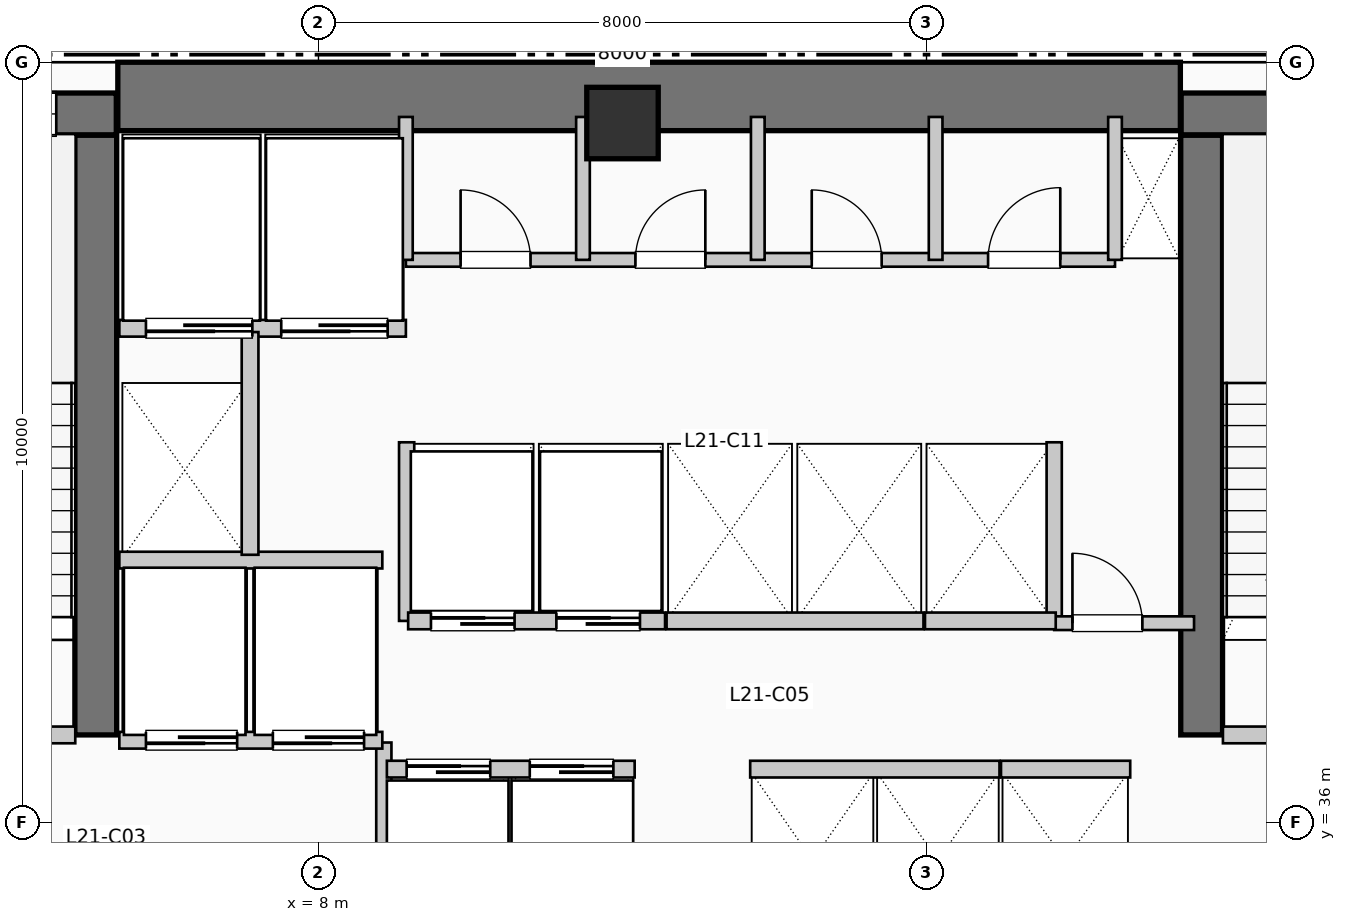
"""IFC4 building model, lengths in metres.
Left out: names, types, materials, properties, quantities, classifications, styles, units other than length and angle.
Written with IfcOpenShell. Run it as: python <this file> out.ifc"""

import sys

from ifc_helpers import new_model, si_unit, direction, frame, frame_2d, origin, origin_2d, place, context, subcontext, project, spatial, rectangle, extrude, element, fill, save


model = new_model("IFC4")
c1 = context("Model", 3, precision=1e-05, world=origin(), true_north=direction((0.0, 1.0)))
c2 = subcontext(c1, "Body", "Model", "MODEL_VIEW")
j1 = project(units=[si_unit("LENGTHUNIT", "METRE"), si_unit("PLANEANGLEUNIT", "RADIAN")], contexts=[c1])
p1 = place(None, origin())
s1 = spatial("IfcSite", under=j1, at=p1, CompositionType="ELEMENT")
p2 = place(p1, origin())
s2 = spatial("IfcBuilding", under=s1, at=p2, CompositionType="ELEMENT")
p3 = place(p2, frame((0.0, 0.0, 89.76)))
s3 = spatial("IfcBuildingStorey", under=s2, at=p3, CompositionType="ELEMENT", Elevation=89.76)
p4 = place(p3, frame((5.36, 45.55, 0.0), z_axis=(0.0, 0.0, 1.0), x_axis=(1.0, 0.0, 0.0)))
e1 = element("IfcWall", 1, at=p4, inside=s3, PredefinedType="SHEAR", context=c2, shape_type="SweptSolid", body=[
    extrude(rectangle(XDim=13.98, YDim=0.9, at=frame_2d((6.99, 0.0))), origin(), (0.0, 0.0, 1.0), 3.96),
])
p5 = place(p3, frame((5.07, 37.15, 0.0), z_axis=(0.0, 0.0, 1.0), x_axis=(0.0, 1.0, 0.0)))
e2 = element("IfcWall", 2, at=p5, inside=s3, PredefinedType="SHEAR", context=c2, shape_type="SweptSolid", body=[
    extrude(rectangle(XDim=7.89, YDim=0.55, at=frame_2d((3.945, 0.0))), origin(), (0.0, 0.0, 1.0), 3.96),
])
p6 = place(p3, frame((1.1, 45.32, 0.0), z_axis=(0.0, 0.0, 1.0), x_axis=(1.0, 0.0, 0.0)))
e3 = element("IfcWall", 3, at=p6, inside=s3, PredefinedType="SHEAR", context=c2, shape_type="SweptSolid", body=[
    extrude(rectangle(XDim=4.24, YDim=0.55, at=frame_2d((2.12, 0.0))), origin(), (0.0, 0.0, 1.0), 3.96),
])
p7 = place(p6, frame((2.05, 0.0, 1.05)))
e4 = element("IfcOpeningElement", 4, at=p7, cuts=e3, PredefinedType="OPENING", context=c2, shape_type="SweptSolid", body=[
    extrude(rectangle(XDim=1.4, YDim=1.8, at=frame_2d((0.7, 0.9))), frame((0.0, 0.285, 0.0), z_axis=(0.0, -1.0, 0.0), x_axis=(1.0, 0.0, 0.0)), (0.0, 0.0, 1.0), 0.57),
])
p8 = place(p3, frame((19.62, 37.15, 0.0), z_axis=(0.0, 0.0, 1.0), x_axis=(0.0, 1.0, 0.0)))
e5 = element("IfcWall", 5, at=p8, inside=s3, PredefinedType="SHEAR", context=c2, shape_type="SweptSolid", body=[
    extrude(rectangle(XDim=7.89, YDim=0.55, at=frame_2d((3.945, 0.0))), origin(), (0.0, 0.0, 1.0), 3.96),
])
p9 = place(p3, frame((19.35, 45.32, 0.0), z_axis=(0.0, 0.0, 1.0), x_axis=(1.0, 0.0, 0.0)))
e6 = element("IfcWall", 6, at=p9, inside=s3, PredefinedType="SHEAR", context=c2, shape_type="SweptSolid", body=[
    extrude(rectangle(XDim=3.69, YDim=0.55, at=frame_2d((1.845, 0.0))), origin(), (0.0, 0.0, 1.0), 3.96),
])
p10 = place(p9, frame((1.15, 0.0, 1.05)))
e7 = element("IfcOpeningElement", 7, at=p10, cuts=e6, PredefinedType="OPENING", context=c2, shape_type="SweptSolid", body=[
    extrude(rectangle(XDim=1.4, YDim=1.8, at=frame_2d((0.7, 0.9))), frame((0.0, 0.285, 0.0), z_axis=(0.0, -1.0, 0.0), x_axis=(1.0, 0.0, 0.0)), (0.0, 0.0, 1.0), 0.57),
])
p11 = place(p3, frame((12.0, 45.2, 0.0), z_axis=(0.0, 0.0, 1.0), x_axis=(1.0, 0.0, 0.0)))
e8 = element("IfcColumn", 8, at=p11, inside=s3, PredefinedType="COLUMN", context=c2, shape_type="SweptSolid", body=[
    extrude(rectangle(XDim=0.94, YDim=0.94, at=origin_2d()), origin(), (0.0, 0.0, 1.0), 3.96),
])
p12 = place(p3, frame((1.65, 37.15, 0.0), z_axis=(0.0, 0.0, 1.0), x_axis=(1.0, 0.0, 0.0)))
e9 = element("IfcWall", 9, at=p12, inside=s3, PredefinedType="PARTITIONING", context=c2, shape_type="SweptSolid", body=[
    extrude(rectangle(XDim=3.15, YDim=0.22, at=frame_2d((1.575, 0.0))), origin(), (0.0, 0.0, 1.0), 3.61),
])
p13 = place(p12, frame((2.05, 0.0, 0.0), z_axis=(0.0, 0.0, 1.0), x_axis=(-1.0, 0.0, 0.0)))
e10 = element("IfcOpeningElement", 10, at=p13, cuts=e9, PredefinedType="OPENING", context=c2, shape_type="SweptSolid", body=[
    extrude(rectangle(XDim=1.05, YDim=2.15, at=frame_2d((0.525, 1.075))), frame((0.0, 0.12, 0.0), z_axis=(0.0, -1.0, 0.0), x_axis=(1.0, 0.0, 0.0)), (0.0, 0.0, 1.0), 0.24),
])
p14 = place(p3, frame((8.86, 34.55, 0.0), z_axis=(0.0, 0.0, 1.0), x_axis=(0.0, 1.0, 0.0)))
e11 = element("IfcWall", 11, at=p14, inside=s3, PredefinedType="PARTITIONING", context=c2, shape_type="SweptSolid", body=[
    extrude(rectangle(XDim=2.5, YDim=0.2, at=frame_2d((1.25, 0.0))), origin(), (0.0, 0.0, 1.0), 3.61),
])
p15 = place(p3, frame((19.9, 37.15, 0.0), z_axis=(0.0, 0.0, 1.0), x_axis=(1.0, 0.0, 0.0)))
e12 = element("IfcWall", 12, at=p15, inside=s3, PredefinedType="PARTITIONING", context=c2, shape_type="SweptSolid", body=[
    extrude(rectangle(XDim=3.15, YDim=0.22, at=frame_2d((1.575, 0.0))), origin(), (0.0, 0.0, 1.0), 3.61),
])
p16 = place(p15, frame((2.05, 0.0, 0.0), z_axis=(0.0, 0.0, 1.0), x_axis=(-1.0, 0.0, 0.0)))
e13 = element("IfcOpeningElement", 13, at=p16, cuts=e12, PredefinedType="OPENING", context=c2, shape_type="SweptSolid", body=[
    extrude(rectangle(XDim=1.05, YDim=2.15, at=frame_2d((0.525, 1.075))), frame((0.0, 0.12, 0.0), z_axis=(0.0, -1.0, 0.0), x_axis=(1.0, 0.0, 0.0)), (0.0, 0.0, 1.0), 0.24),
])
p17 = place(p3, frame((5.38, 37.08, 0.0), z_axis=(0.0, 0.0, 1.0), x_axis=(1.0, 0.0, 0.0)))
e14 = element("IfcWall", 14, at=p17, inside=s3, PredefinedType="PARTITIONING", context=c2, shape_type="SweptSolid", body=[
    extrude(rectangle(XDim=3.46, YDim=0.22, at=frame_2d((1.73, 0.0))), origin(), (0.0, 0.0, 1.0), 3.61),
])
p18 = place(p17, frame((1.55, 0.0, 0.0), z_axis=(0.0, 0.0, 1.0), x_axis=(-1.0, 0.0, 0.0)))
e15 = element("IfcOpeningElement", 15, at=p18, cuts=e14, PredefinedType="OPENING", context=c2, shape_type="SweptSolid", body=[
    extrude(rectangle(XDim=1.2, YDim=2.2, at=frame_2d((0.6, 1.1))), frame((0.0, 0.12, 0.0), z_axis=(0.0, -1.0, 0.0), x_axis=(1.0, 0.0, 0.0)), (0.0, 0.0, 1.0), 0.24),
])
p19 = place(p17, frame((3.22, 0.0, 0.0), z_axis=(0.0, 0.0, 1.0), x_axis=(-1.0, 0.0, 0.0)))
e16 = element("IfcOpeningElement", 16, at=p19, cuts=e14, PredefinedType="OPENING", context=c2, shape_type="SweptSolid", body=[
    extrude(rectangle(XDim=1.2, YDim=2.2, at=frame_2d((0.6, 1.1))), frame((0.0, 0.12, 0.0), z_axis=(0.0, -1.0, 0.0), x_axis=(1.0, 0.0, 0.0)), (0.0, 0.0, 1.0), 0.24),
])
p20 = place(p3, frame((5.38, 39.45, 0.0), z_axis=(0.0, 0.0, 1.0), x_axis=(1.0, 0.0, 0.0)))
e17 = element("IfcWall", 17, at=p20, inside=s3, PredefinedType="PARTITIONING", context=c2, shape_type="SweptSolid", body=[
    extrude(rectangle(XDim=3.46, YDim=0.22, at=frame_2d((1.73, 0.0))), origin(), (0.0, 0.0, 1.0), 3.61),
])
p21 = place(p3, frame((5.38, 42.5, 0.0), z_axis=(0.0, 0.0, 1.0), x_axis=(1.0, 0.0, 0.0)))
e18 = element("IfcWall", 18, at=p21, inside=s3, PredefinedType="PARTITIONING", context=c2, shape_type="SweptSolid", body=[
    extrude(rectangle(XDim=3.77, YDim=0.22, at=frame_2d((1.885, 0.0))), origin(), (0.0, 0.0, 1.0), 3.61),
])
p22 = place(p21, frame((1.75, 0.0, 0.0), z_axis=(0.0, 0.0, 1.0), x_axis=(-1.0, 0.0, 0.0)))
e19 = element("IfcOpeningElement", 19, at=p22, cuts=e18, PredefinedType="OPENING", context=c2, shape_type="SweptSolid", body=[
    extrude(rectangle(XDim=1.4, YDim=2.2, at=frame_2d((0.7, 1.1))), frame((0.0, 0.12, 0.0), z_axis=(0.0, -1.0, 0.0), x_axis=(1.0, 0.0, 0.0)), (0.0, 0.0, 1.0), 0.24),
])
p23 = place(p21, frame((3.53, 0.0, 0.0), z_axis=(0.0, 0.0, 1.0), x_axis=(-1.0, 0.0, 0.0)))
e20 = element("IfcOpeningElement", 20, at=p23, cuts=e18, PredefinedType="OPENING", context=c2, shape_type="SweptSolid", body=[
    extrude(rectangle(XDim=1.4, YDim=2.2, at=frame_2d((0.7, 1.1))), frame((0.0, 0.12, 0.0), z_axis=(0.0, -1.0, 0.0), x_axis=(1.0, 0.0, 0.0)), (0.0, 0.0, 1.0), 0.24),
])
p24 = place(p3, frame((7.1, 39.52, 0.0), z_axis=(0.0, 0.0, 1.0), x_axis=(0.0, 1.0, 0.0)))
e21 = element("IfcWall", 21, at=p24, inside=s3, PredefinedType="PARTITIONING", context=c2, shape_type="SweptSolid", body=[
    extrude(rectangle(XDim=2.93, YDim=0.22, at=frame_2d((1.465, 0.0))), origin(), (0.0, 0.0, 1.0), 3.61),
])
for number, where, z_axis, x_axis in (
    (22, (9.16, 38.65, 0.0), (0.0, 0.0, 1.0), (0.0, 1.0, 0.0)),
    (23, (17.68, 38.65, 0.0), (0.0, 0.0, 1.0), (0.0, 1.0, 0.0)),
):
    element("IfcWall", number, at=place(p3, frame(where, z_axis=z_axis, x_axis=x_axis)), inside=s3, PredefinedType="PARTITIONING", context=c2, shape_type="SweptSolid", body=[
        extrude(rectangle(XDim=2.35, YDim=0.2, at=frame_2d((1.175, 0.0))), origin(), (0.0, 0.0, 1.0), 3.61),
    ])
p25 = place(p3, frame((17.68, 38.62, 0.0), z_axis=(0.0, 0.0, 1.0), x_axis=(1.0, 0.0, 0.0)))
e24 = element("IfcWall", 24, at=p25, inside=s3, PredefinedType="PARTITIONING", context=c2, shape_type="SweptSolid", body=[
    extrude(rectangle(XDim=1.84, YDim=0.18, at=frame_2d((0.92, 0.0))), origin(), (0.0, 0.0, 1.0), 3.61),
])
p26 = place(p25, frame((0.24, 0.0, 0.0)))
e25 = element("IfcOpeningElement", 25, at=p26, cuts=e24, PredefinedType="OPENING", context=c2, shape_type="SweptSolid", body=[
    extrude(rectangle(XDim=0.92, YDim=2.1, at=frame_2d((0.46, 1.05))), frame((0.0, 0.1, 0.0), z_axis=(0.0, -1.0, 0.0), x_axis=(1.0, 0.0, 0.0)), (0.0, 0.0, 1.0), 0.2),
])
p27 = place(p3, frame((8.9, 36.7, 0.0), z_axis=(0.0, 0.0, 1.0), x_axis=(1.0, 0.0, 0.0)))
e26 = element("IfcWall", 26, at=p27, inside=s3, PredefinedType="PARTITIONING", context=c2, shape_type="SweptSolid", body=[
    extrude(rectangle(XDim=3.26, YDim=0.22, at=frame_2d((1.63, 0.0))), origin(), (0.0, 0.0, 1.0), 3.61),
])
p28 = place(p27, frame((0.26, 0.0, 0.0)))
e27 = element("IfcOpeningElement", 27, at=p28, cuts=e26, PredefinedType="OPENING", context=c2, shape_type="SweptSolid", body=[
    extrude(rectangle(XDim=1.1, YDim=2.2, at=frame_2d((0.55, 1.1))), frame((0.0, 0.12, 0.0), z_axis=(0.0, -1.0, 0.0), x_axis=(1.0, 0.0, 0.0)), (0.0, 0.0, 1.0), 0.24),
])
p29 = place(p27, frame((1.88, 0.0, 0.0)))
e28 = element("IfcOpeningElement", 28, at=p29, cuts=e26, PredefinedType="OPENING", context=c2, shape_type="SweptSolid", body=[
    extrude(rectangle(XDim=1.1, YDim=2.2, at=frame_2d((0.55, 1.1))), frame((0.0, 0.12, 0.0), z_axis=(0.0, -1.0, 0.0), x_axis=(1.0, 0.0, 0.0)), (0.0, 0.0, 1.0), 0.24),
])
p30 = place(p3, frame((9.18, 38.65, 0.0), z_axis=(0.0, 0.0, 1.0), x_axis=(1.0, 0.0, 0.0)))
e29 = element("IfcWall", 29, at=p30, inside=s3, PredefinedType="PARTITIONING", context=c2, shape_type="SweptSolid", body=[
    extrude(rectangle(XDim=3.38, YDim=0.22, at=frame_2d((1.69, 0.0))), origin(), (0.0, 0.0, 1.0), 3.61),
])
p31 = place(p30, frame((0.3, 0.0, 0.0)))
e30 = element("IfcOpeningElement", 30, at=p31, cuts=e29, PredefinedType="OPENING", context=c2, shape_type="SweptSolid", body=[
    extrude(rectangle(XDim=1.1, YDim=2.2, at=frame_2d((0.55, 1.1))), frame((0.0, 0.12, 0.0), z_axis=(0.0, -1.0, 0.0), x_axis=(1.0, 0.0, 0.0)), (0.0, 0.0, 1.0), 0.24),
])
p32 = place(p30, frame((1.95, 0.0, 0.0)))
e31 = element("IfcOpeningElement", 31, at=p32, cuts=e29, PredefinedType="OPENING", context=c2, shape_type="SweptSolid", body=[
    extrude(rectangle(XDim=1.1, YDim=2.2, at=frame_2d((0.55, 1.1))), frame((0.0, 0.12, 0.0), z_axis=(0.0, -1.0, 0.0), x_axis=(1.0, 0.0, 0.0)), (0.0, 0.0, 1.0), 0.24),
])
p33 = place(p3, frame((13.68, 36.7, 0.0), z_axis=(0.0, 0.0, 1.0), x_axis=(1.0, 0.0, 0.0)))
e32 = element("IfcWall", 32, at=p33, inside=s3, PredefinedType="PARTITIONING", context=c2, shape_type="SweptSolid", body=[
    extrude(rectangle(XDim=3.28, YDim=0.22, at=frame_2d((1.64, 0.0))), origin(), (0.0, 0.0, 1.0), 3.61),
])
p34 = place(p3, frame((12.58, 38.65, 0.0), z_axis=(0.0, 0.0, 1.0), x_axis=(1.0, 0.0, 0.0)))
e33 = element("IfcWall", 33, at=p34, inside=s3, PredefinedType="PARTITIONING", context=c2, shape_type="SweptSolid", body=[
    extrude(rectangle(XDim=3.38, YDim=0.22, at=frame_2d((1.69, 0.0))), origin(), (0.0, 0.0, 1.0), 3.61),
])
p35 = place(p3, frame((16.98, 36.7, 0.0), z_axis=(0.0, 0.0, 1.0), x_axis=(1.0, 0.0, 0.0)))
e34 = element("IfcWall", 34, at=p35, inside=s3, PredefinedType="PARTITIONING", context=c2, shape_type="SweptSolid", body=[
    extrude(rectangle(XDim=1.7, YDim=0.22, at=frame_2d((0.85, 0.0))), origin(), (0.0, 0.0, 1.0), 3.61),
])
p36 = place(p3, frame((15.98, 38.65, 0.0), z_axis=(0.0, 0.0, 1.0), x_axis=(1.0, 0.0, 0.0)))
e35 = element("IfcWall", 35, at=p36, inside=s3, PredefinedType="PARTITIONING", context=c2, shape_type="SweptSolid", body=[
    extrude(rectangle(XDim=1.72, YDim=0.22, at=frame_2d((0.86, 0.0))), origin(), (0.0, 0.0, 1.0), 3.61),
])
p37 = place(p3, frame((9.15, 43.4, 0.0), z_axis=(0.0, 0.0, 1.0), x_axis=(1.0, 0.0, 0.0)))
e36 = element("IfcWall", 36, at=p37, inside=s3, PredefinedType="PLUMBINGWALL", context=c2, shape_type="SweptSolid", body=[
    extrude(rectangle(XDim=9.33, YDim=0.18, at=frame_2d((4.665, 0.0))), origin(), (0.0, 0.0, 1.0), 3.61),
])
p38 = place(p37, frame((0.72, 0.0, 0.0)))
e37 = element("IfcOpeningElement", 37, at=p38, cuts=e36, PredefinedType="OPENING", context=c2, shape_type="SweptSolid", body=[
    extrude(rectangle(XDim=0.92, YDim=2.1, at=frame_2d((0.46, 1.05))), frame((0.0, 0.1, 0.0), z_axis=(0.0, -1.0, 0.0), x_axis=(1.0, 0.0, 0.0)), (0.0, 0.0, 1.0), 0.2),
])
p39 = place(p37, frame((3.02, 0.0, 0.0)))
e38 = element("IfcOpeningElement", 38, at=p39, cuts=e36, PredefinedType="OPENING", context=c2, shape_type="SweptSolid", body=[
    extrude(rectangle(XDim=0.92, YDim=2.1, at=frame_2d((0.46, 1.05))), frame((0.0, 0.1, 0.0), z_axis=(0.0, -1.0, 0.0), x_axis=(1.0, 0.0, 0.0)), (0.0, 0.0, 1.0), 0.2),
])
p40 = place(p37, frame((5.34, 0.0, 0.0)))
e39 = element("IfcOpeningElement", 39, at=p40, cuts=e36, PredefinedType="OPENING", context=c2, shape_type="SweptSolid", body=[
    extrude(rectangle(XDim=0.92, YDim=2.1, at=frame_2d((0.46, 1.05))), frame((0.0, 0.1, 0.0), z_axis=(0.0, -1.0, 0.0), x_axis=(1.0, 0.0, 0.0)), (0.0, 0.0, 1.0), 0.2),
])
p41 = place(p37, frame((7.66, 0.0, 0.0)))
e40 = element("IfcOpeningElement", 40, at=p41, cuts=e36, PredefinedType="OPENING", context=c2, shape_type="SweptSolid", body=[
    extrude(rectangle(XDim=0.95, YDim=2.1, at=frame_2d((0.475, 1.05))), frame((0.0, 0.1, 0.0), z_axis=(0.0, -1.0, 0.0), x_axis=(1.0, 0.0, 0.0)), (0.0, 0.0, 1.0), 0.2),
])
for number, where, z_axis, x_axis in (
    (41, (9.15, 43.4, 0.0), (0.0, 0.0, 1.0), (0.0, 1.0, 0.0)),
    (42, (18.48, 43.4, 0.0), (0.0, 0.0, 1.0), (0.0, 1.0, 0.0)),
    (43, (11.48, 43.4, 0.0), (0.0, 0.0, 1.0), (0.0, 1.0, 0.0)),
    (44, (13.78, 43.4, 0.0), (0.0, 0.0, 1.0), (0.0, 1.0, 0.0)),
    (45, (16.12, 43.4, 0.0), (0.0, 0.0, 1.0), (0.0, 1.0, 0.0)),
):
    element("IfcWall", number, at=place(p3, frame(where, z_axis=z_axis, x_axis=x_axis)), inside=s3, PredefinedType="PLUMBINGWALL", context=c2, shape_type="SweptSolid", body=[
        extrude(rectangle(XDim=1.88, YDim=0.18, at=frame_2d((0.94, 0.0))), origin(), (0.0, 0.0, 1.0), 3.61),
    ])
p42 = place(p7, origin())
e46 = element("IfcWindow", 46, at=p42, inside=s3, PartitioningType="SINGLE_PANEL", PredefinedType="WINDOW", context=c2, shape_type="SweptSolid", body=[
    extrude(rectangle(XDim=1.4, YDim=1.8, at=frame_2d((0.7, 0.9))), frame((0.0, 0.03, 0.0), z_axis=(0.0, -1.0, 0.0), x_axis=(1.0, 0.0, 0.0)), (0.0, 0.0, 1.0), 0.06),
])
fill(e4, e46)
p43 = place(p18, origin())
e47 = element("IfcDoor", 47, at=p43, inside=s3, OperationType="SLIDING_TO_RIGHT", PredefinedType="DOOR", context=c2, shape_type="SweptSolid", body=[
    extrude(rectangle(XDim=1.2, YDim=2.2, at=frame_2d((0.6, 1.1))), frame((0.0, 0.025, 0.0), z_axis=(0.0, -1.0, 0.0), x_axis=(1.0, 0.0, 0.0)), (0.0, 0.0, 1.0), 0.05),
])
fill(e15, e47)
p44 = place(p19, origin())
e48 = element("IfcDoor", 48, at=p44, inside=s3, OperationType="SLIDING_TO_RIGHT", PredefinedType="DOOR", context=c2, shape_type="SweptSolid", body=[
    extrude(rectangle(XDim=1.2, YDim=2.2, at=frame_2d((0.6, 1.1))), frame((0.0, 0.025, 0.0), z_axis=(0.0, -1.0, 0.0), x_axis=(1.0, 0.0, 0.0)), (0.0, 0.0, 1.0), 0.05),
])
fill(e16, e48)
p45 = place(p22, origin())
e49 = element("IfcDoor", 49, at=p45, inside=s3, OperationType="SLIDING_TO_LEFT", PredefinedType="DOOR", context=c2, shape_type="SweptSolid", body=[
    extrude(rectangle(XDim=1.4, YDim=2.2, at=frame_2d((0.7, 1.1))), frame((0.0, 0.025, 0.0), z_axis=(0.0, -1.0, 0.0), x_axis=(1.0, 0.0, 0.0)), (0.0, 0.0, 1.0), 0.05),
])
fill(e19, e49)
p46 = place(p23, origin())
e50 = element("IfcDoor", 50, at=p46, inside=s3, OperationType="SLIDING_TO_LEFT", PredefinedType="DOOR", context=c2, shape_type="SweptSolid", body=[
    extrude(rectangle(XDim=1.4, YDim=2.2, at=frame_2d((0.7, 1.1))), frame((0.0, 0.025, 0.0), z_axis=(0.0, -1.0, 0.0), x_axis=(1.0, 0.0, 0.0)), (0.0, 0.0, 1.0), 0.05),
])
fill(e20, e50)
p47 = place(p26, origin())
e51 = element("IfcDoor", 51, at=p47, inside=s3, OperationType="SINGLE_SWING_LEFT", PredefinedType="DOOR", context=c2, shape_type="SweptSolid", body=[
    extrude(rectangle(XDim=0.92, YDim=2.1, at=frame_2d((0.46, 1.05))), frame((0.0, 0.025, 0.0), z_axis=(0.0, -1.0, 0.0), x_axis=(1.0, 0.0, 0.0)), (0.0, 0.0, 1.0), 0.05),
])
fill(e25, e51)
p48 = place(p28, origin())
e52 = element("IfcDoor", 52, at=p48, inside=s3, OperationType="SLIDING_TO_LEFT", PredefinedType="DOOR", context=c2, shape_type="SweptSolid", body=[
    extrude(rectangle(XDim=1.1, YDim=2.2, at=frame_2d((0.55, 1.1))), frame((0.0, 0.025, 0.0), z_axis=(0.0, -1.0, 0.0), x_axis=(1.0, 0.0, 0.0)), (0.0, 0.0, 1.0), 0.05),
])
fill(e27, e52)
p49 = place(p29, origin())
e53 = element("IfcDoor", 53, at=p49, inside=s3, OperationType="SLIDING_TO_LEFT", PredefinedType="DOOR", context=c2, shape_type="SweptSolid", body=[
    extrude(rectangle(XDim=1.1, YDim=2.2, at=frame_2d((0.55, 1.1))), frame((0.0, 0.025, 0.0), z_axis=(0.0, -1.0, 0.0), x_axis=(1.0, 0.0, 0.0)), (0.0, 0.0, 1.0), 0.05),
])
fill(e28, e53)
p50 = place(p31, origin())
e54 = element("IfcDoor", 54, at=p50, inside=s3, OperationType="SLIDING_TO_LEFT", PredefinedType="DOOR", context=c2, shape_type="SweptSolid", body=[
    extrude(rectangle(XDim=1.1, YDim=2.2, at=frame_2d((0.55, 1.1))), frame((0.0, 0.025, 0.0), z_axis=(0.0, -1.0, 0.0), x_axis=(1.0, 0.0, 0.0)), (0.0, 0.0, 1.0), 0.05),
])
fill(e30, e54)
p51 = place(p32, origin())
e55 = element("IfcDoor", 55, at=p51, inside=s3, OperationType="SLIDING_TO_LEFT", PredefinedType="DOOR", context=c2, shape_type="SweptSolid", body=[
    extrude(rectangle(XDim=1.1, YDim=2.2, at=frame_2d((0.55, 1.1))), frame((0.0, 0.025, 0.0), z_axis=(0.0, -1.0, 0.0), x_axis=(1.0, 0.0, 0.0)), (0.0, 0.0, 1.0), 0.05),
])
fill(e31, e55)
p52 = place(p38, origin())
e56 = element("IfcDoor", 56, at=p52, inside=s3, OperationType="SINGLE_SWING_LEFT", PredefinedType="DOOR", context=c2, shape_type="SweptSolid", body=[
    extrude(rectangle(XDim=0.92, YDim=2.1, at=frame_2d((0.46, 1.05))), frame((0.0, 0.025, 0.0), z_axis=(0.0, -1.0, 0.0), x_axis=(1.0, 0.0, 0.0)), (0.0, 0.0, 1.0), 0.05),
])
fill(e37, e56)
p53 = place(p39, origin())
e57 = element("IfcDoor", 57, at=p53, inside=s3, OperationType="SINGLE_SWING_RIGHT", PredefinedType="DOOR", context=c2, shape_type="SweptSolid", body=[
    extrude(rectangle(XDim=0.92, YDim=2.1, at=frame_2d((0.46, 1.05))), frame((0.0, 0.025, 0.0), z_axis=(0.0, -1.0, 0.0), x_axis=(1.0, 0.0, 0.0)), (0.0, 0.0, 1.0), 0.05),
])
fill(e38, e57)
p54 = place(p40, origin())
e58 = element("IfcDoor", 58, at=p54, inside=s3, OperationType="SINGLE_SWING_LEFT", PredefinedType="DOOR", context=c2, shape_type="SweptSolid", body=[
    extrude(rectangle(XDim=0.92, YDim=2.1, at=frame_2d((0.46, 1.05))), frame((0.0, 0.025, 0.0), z_axis=(0.0, -1.0, 0.0), x_axis=(1.0, 0.0, 0.0)), (0.0, 0.0, 1.0), 0.05),
])
fill(e39, e58)
p55 = place(p41, origin())
e59 = element("IfcDoor", 59, at=p55, inside=s3, OperationType="SINGLE_SWING_RIGHT", PredefinedType="DOOR", context=c2, shape_type="SweptSolid", body=[
    extrude(rectangle(XDim=0.95, YDim=2.1, at=frame_2d((0.475, 1.05))), frame((0.0, 0.025, 0.0), z_axis=(0.0, -1.0, 0.0), x_axis=(1.0, 0.0, 0.0)), (0.0, 0.0, 1.0), 0.05),
])
fill(e40, e59)
save(model, sys.argv[1])
